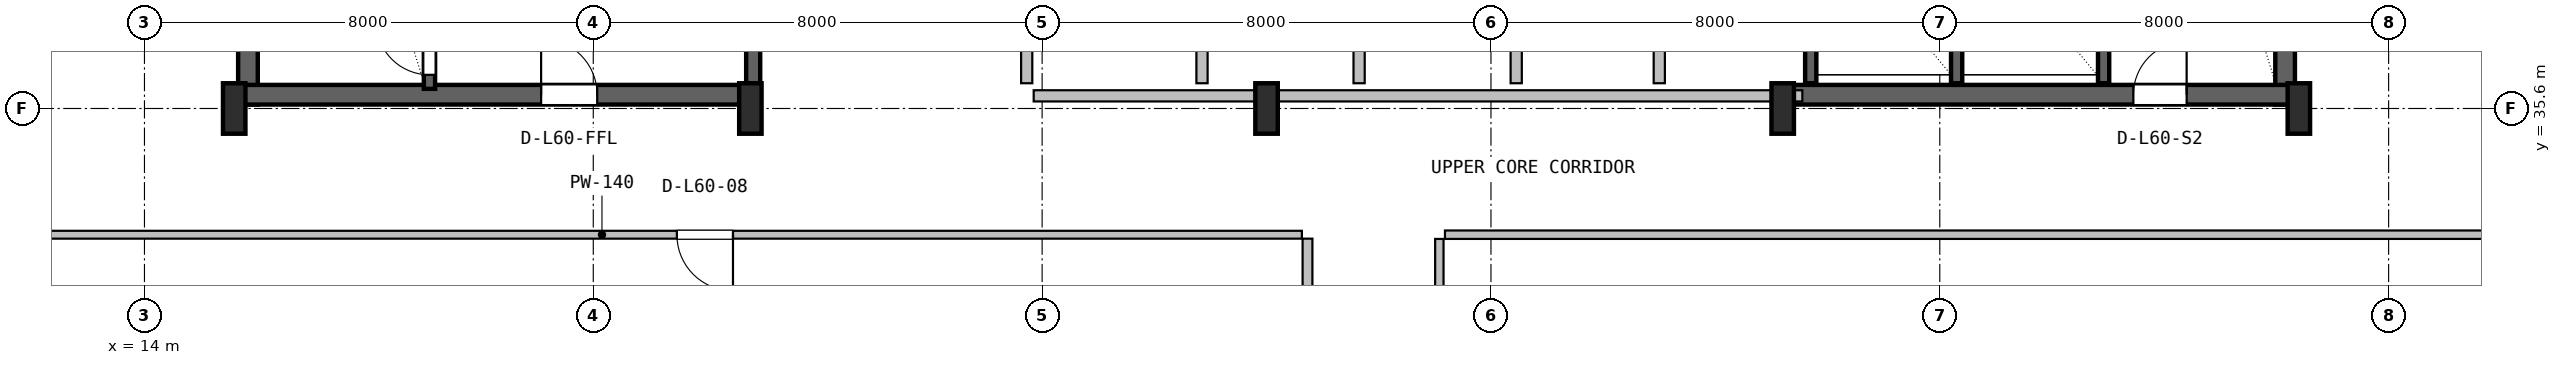
"""IFC4 building model, lengths in metres.
Left out: names, types, materials, properties, quantities, classifications, styles, units other than length and angle.
Written with IfcOpenShell. Run it as: python <this file> out.ifc"""

import sys

from ifc_helpers import new_model, si_unit, direction, frame, frame_2d, origin, origin_2d, place, context, subcontext, project, spatial, rectangle, i_section, extrude, source, transform, mapped, element, fill, save


model = new_model("IFC4")
c1 = context("Model", 3, precision=1e-05, world=origin(), true_north=direction((0.0, 1.0)))
c2 = subcontext(c1, "Body", "Model", "MODEL_VIEW")
j1 = project(units=[si_unit("LENGTHUNIT", "METRE"), si_unit("PLANEANGLEUNIT", "RADIAN")], contexts=[c1])
p1 = place(None, origin())
s1 = spatial("IfcSite", under=j1, at=p1, CompositionType="ELEMENT")
p2 = place(p1, origin())
s2 = spatial("IfcBuilding", under=s1, at=p2, CompositionType="ELEMENT")
p3 = place(p2, frame((0.0, 0.0, 243.2)))
s3 = spatial("IfcBuildingStorey", under=s2, at=p3, CompositionType="ELEMENT", Elevation=243.2)
for number, where, z_axis, x_axis in (
    (1, (15.845, 35.67, 0.0), (0.0, 0.0, 1.0), (0.0, 1.0, 0.0)),
    (2, (52.155, 35.67, 0.0), (0.0, 0.0, 1.0), (0.0, 1.0, 0.0)),
):
    element("IfcWall", number, at=place(p3, frame(where, z_axis=z_axis, x_axis=x_axis)), inside=s3, PredefinedType="SHEAR", context=c2, shape_type="SweptSolid", body=[
        extrude(rectangle(XDim=11.13, YDim=0.35, at=frame_2d((5.565, 0.0))), origin(), (0.0, 0.0, 1.0), 3.55),
    ])
p4 = place(p3, frame((15.67, 35.845, 0.0), z_axis=(0.0, 0.0, 1.0), x_axis=(1.0, 0.0, 0.0)))
e3 = element("IfcWall", 3, at=p4, inside=s3, PredefinedType="SHEAR", context=c2, shape_type="SweptSolid", body=[
    extrude(rectangle(XDim=9.13, YDim=0.35, at=frame_2d((4.565, 0.0))), origin(), (0.0, 0.0, 1.0), 3.55),
])
p5 = place(p4, frame((5.4, 0.0, 0.0)))
e4 = element("IfcOpeningElement", 4, at=p5, cuts=e3, PredefinedType="OPENING", context=c2, shape_type="SweptSolid", body=[
    extrude(rectangle(XDim=1.0, YDim=2.1, at=frame_2d((0.5, 1.05))), frame((0.0, 0.185, 0.0), z_axis=(0.0, -1.0, 0.0), x_axis=(1.0, 0.0, 0.0)), (0.0, 0.0, 1.0), 0.37),
])
p6 = place(p3, frame((43.2, 35.845, 0.0), z_axis=(0.0, 0.0, 1.0), x_axis=(1.0, 0.0, 0.0)))
e5 = element("IfcWall", 5, at=p6, inside=s3, PredefinedType="SHEAR", context=c2, shape_type="SweptSolid", body=[
    extrude(rectangle(XDim=9.13, YDim=0.35, at=frame_2d((4.565, 0.0))), origin(), (0.0, 0.0, 1.0), 3.55),
])
p7 = place(p6, frame((6.25, 0.0, 0.0)))
e6 = element("IfcOpeningElement", 6, at=p7, cuts=e5, PredefinedType="OPENING", context=c2, shape_type="SweptSolid", body=[
    extrude(rectangle(XDim=0.95, YDim=2.1, at=frame_2d((0.475, 1.05))), frame((0.0, 0.185, 0.0), z_axis=(0.0, -1.0, 0.0), x_axis=(1.0, 0.0, 0.0)), (0.0, 0.0, 1.0), 0.37),
])
m1 = source(origin(), c2, "Body", "SweptSolid", [
    extrude(i_section(OverallWidth=0.4, OverallDepth=0.9, WebThickness=0.016, FlangeThickness=0.028, FilletRadius=0.016, at=origin_2d()), origin(), (0.0, 0.0, 1.0), 3.8),
])
for number, where, z_axis, x_axis in (
    (7, (15.6, 35.6, 0.0), (0.0, 0.0, 1.0), (1.0, 0.0, 0.0)),
    (8, (24.8, 35.6, 0.0), (0.0, 0.0, 1.0), (1.0, 0.0, 0.0)),
    (9, (34.0, 35.6, 0.0), (0.0, 0.0, 1.0), (1.0, 0.0, 0.0)),
    (10, (43.2, 35.6, 0.0), (0.0, 0.0, 1.0), (1.0, 0.0, 0.0)),
    (11, (52.4, 35.6, 0.0), (0.0, 0.0, 1.0), (1.0, 0.0, 0.0)),
):
    element("IfcColumn", number, at=place(p3, frame(where, z_axis=z_axis, x_axis=x_axis)), inside=s3, PredefinedType="COLUMN", context=c2, shape_type="MappedRepresentation", body=[
        mapped(m1, transform((0.0, 0.0, 0.0), x_axis=(1.0, 0.0, 0.0), y_axis=(0.0, 1.0, 0.0), z_axis=(0.0, 0.0, 1.0), scale=1.0)),
    ])
p8 = place(p3, frame((19.08, 35.95, 0.0), z_axis=(0.0, 0.0, 1.0), x_axis=(0.0, 1.0, 0.0)))
e12 = element("IfcWall", 12, at=p8, inside=s3, PredefinedType="SHEAR", context=c2, shape_type="SweptSolid", body=[
    extrude(rectangle(XDim=9.65, YDim=0.2, at=frame_2d((4.825, 0.0))), origin(), (0.0, 0.0, 1.0), 3.55),
])
p9 = place(p8, frame((0.25, 0.0, 0.0)))
e13 = element("IfcOpeningElement", 13, at=p9, cuts=e12, PredefinedType="OPENING", context=c2, shape_type="SweptSolid", body=[
    extrude(rectangle(XDim=0.95, YDim=2.1, at=frame_2d((0.475, 1.05))), frame((0.0, 0.11, 0.0), z_axis=(0.0, -1.0, 0.0), x_axis=(1.0, 0.0, 0.0)), (0.0, 0.0, 1.0), 0.22),
])
p10 = place(p3, frame((24.85, 36.05, 0.0), z_axis=(0.0, 0.0, 1.0), x_axis=(0.0, 1.0, 0.0)))
e14 = element("IfcWall", 14, at=p10, inside=s3, PredefinedType="SHEAR", context=c2, shape_type="SweptSolid", body=[
    extrude(rectangle(XDim=10.45, YDim=0.25, at=frame_2d((5.225, 0.0))), origin(), (0.0, 0.0, 1.0), 3.55),
])
p11 = place(p3, frame((48.92, 36.05, 0.0), z_axis=(0.0, 0.0, 1.0), x_axis=(0.0, 1.0, 0.0)))
e15 = element("IfcWall", 15, at=p11, inside=s3, PredefinedType="SHEAR", context=c2, shape_type="SweptSolid", body=[
    extrude(rectangle(XDim=10.5, YDim=0.2, at=frame_2d((5.25, 0.0))), origin(), (0.0, 0.0, 1.0), 3.55),
])
for number, where, z_axis, x_axis in (
    (16, (43.7, 36.05, 0.0), (0.0, 0.0, 1.0), (0.0, 1.0, 0.0)),
    (17, (46.3, 36.05, 0.0), (0.0, 0.0, 1.0), (0.0, 1.0, 0.0)),
):
    element("IfcWall", number, at=place(p3, frame(where, z_axis=z_axis, x_axis=x_axis)), inside=s3, PredefinedType="SHEAR", context=c2, shape_type="SweptSolid", body=[
        extrude(rectangle(XDim=3.05, YDim=0.2, at=frame_2d((1.525, 0.0))), origin(), (0.0, 0.0, 1.0), 3.55),
    ])
p12 = place(p3, frame((29.85, 35.825, 0.0), z_axis=(0.0, 0.0, 1.0), x_axis=(1.0, 0.0, 0.0)))
e18 = element("IfcWall", 18, at=p12, inside=s3, PredefinedType="SOLIDWALL", context=c2, shape_type="SweptSolid", body=[
    extrude(rectangle(XDim=13.7, YDim=0.2, at=frame_2d((6.85, 0.0))), origin(), (0.0, 0.0, 1.0), 2.575),
])
for number, where, z_axis, x_axis in (
    (19, (32.85, 36.05, 0.0), (0.0, 0.0, 1.0), (0.0, 1.0, 0.0)),
    (20, (29.725, 36.05, 0.0), (0.0, 0.0, 1.0), (0.0, 1.0, 0.0)),
    (21, (35.65, 36.05, 0.0), (0.0, 0.0, 1.0), (0.0, 1.0, 0.0)),
    (22, (38.45, 36.05, 0.0), (0.0, 0.0, 1.0), (0.0, 1.0, 0.0)),
):
    element("IfcWall", number, at=place(p3, frame(where, z_axis=z_axis, x_axis=x_axis)), inside=s3, PredefinedType="PLUMBINGWALL", context=c2, shape_type="SweptSolid", body=[
        extrude(rectangle(XDim=3.1, YDim=0.2, at=frame_2d((1.55, 0.0))), origin(), (0.0, 0.0, 1.0), 3.53),
    ])
p13 = place(p3, frame((41.0, 36.05, 0.0), z_axis=(0.0, 0.0, 1.0), x_axis=(0.0, 1.0, 0.0)))
e23 = element("IfcWall", 23, at=p13, inside=s3, PredefinedType="SOLIDWALL", context=c2, shape_type="SweptSolid", body=[
    extrude(rectangle(XDim=3.1, YDim=0.2, at=frame_2d((1.55, 0.0))), origin(), (0.0, 0.0, 1.0), 3.53),
])
p14 = place(p3, frame((34.73, 17.837, 0.0), z_axis=(0.0, 0.0, 1.0), x_axis=(0.0, 1.0, 0.0)))
e24 = element("IfcWall", 24, at=p14, inside=s3, PredefinedType="PARTITIONING", context=c2, shape_type="SweptSolid", body=[
    extrude(rectangle(XDim=15.443, YDim=0.175, at=frame_2d((7.722, 0.0))), origin(), (0.0, 0.0, 1.0), 2.908),
])
p15 = place(p3, frame((9.68, 33.35, 0.0), z_axis=(0.0, 0.0, 1.0), x_axis=(1.0, 0.0, 0.0)))
e25 = element("IfcWall", 25, at=p15, inside=s3, PredefinedType="PARTITIONING", context=c2, shape_type="SweptSolid", body=[
    extrude(rectangle(XDim=24.95, YDim=0.14, at=frame_2d((12.475, 0.0))), origin(), (0.0, 0.0, 1.0), 2.908),
])
p16 = place(p15, frame((13.81, 0.0, 0.0)))
e26 = element("IfcOpeningElement", 26, at=p16, cuts=e25, PredefinedType="OPENING", context=c2, shape_type="SweptSolid", body=[
    extrude(rectangle(XDim=1.0, YDim=2.1, at=frame_2d((0.5, 1.05))), frame((0.0, 0.08, 0.0), z_axis=(0.0, -1.0, 0.0), x_axis=(1.0, 0.0, 0.0)), (0.0, 0.0, 1.0), 0.16),
])
p17 = place(p3, frame((37.18, 33.35, 0.0), z_axis=(0.0, 0.0, 1.0), x_axis=(1.0, 0.0, 0.0)))
e27 = element("IfcWall", 27, at=p17, inside=s3, PredefinedType="PARTITIONING", context=c2, shape_type="SweptSolid", body=[
    extrude(rectangle(XDim=21.14, YDim=0.15, at=frame_2d((10.57, 0.0))), origin(), (0.0, 0.0, 1.0), 2.908),
])
p18 = place(p3, frame((37.08, 10.38, 0.0), z_axis=(0.0, 0.0, 1.0), x_axis=(0.0, 1.0, 0.0)))
e28 = element("IfcWall", 28, at=p18, inside=s3, PredefinedType="PARTITIONING", context=c2, shape_type="SweptSolid", body=[
    extrude(rectangle(XDim=22.895, YDim=0.15, at=frame_2d((11.448, 0.0))), origin(), (0.0, 0.0, 1.0), 2.908),
])
p19 = place(p18, frame((11.45, 0.0, 0.0)))
e29 = element("IfcOpeningElement", 29, at=p19, cuts=e28, PredefinedType="OPENING", context=c2, shape_type="SweptSolid", body=[
    extrude(rectangle(XDim=0.88, YDim=2.06, at=frame_2d((0.44, 1.03))), frame((0.0, 0.085, 0.0), z_axis=(0.0, -1.0, 0.0), x_axis=(1.0, 0.0, 0.0)), (0.0, 0.0, 1.0), 0.17),
])
m2 = source(origin(), c2, "Body", "SweptSolid", [
    extrude(rectangle(XDim=0.95, YDim=2.1, at=frame_2d((0.475, 1.05))), frame((0.0, 0.025, 0.0), z_axis=(0.0, -1.0, 0.0), x_axis=(1.0, 0.0, 0.0)), (0.0, 0.0, 1.0), 0.05),
])
p20 = place(p9, origin())
e30 = element("IfcDoor", 30, at=p20, inside=s3, OperationType="SINGLE_SWING_RIGHT", PredefinedType="DOOR", context=c2, shape_type="MappedRepresentation", body=[
    mapped(m2, transform((0.0, 0.0, 0.0), x_axis=(1.0, 0.0, 0.0), y_axis=(0.0, 1.0, 0.0), z_axis=(0.0, 0.0, 1.0), scale=1.0)),
])
fill(e13, e30)
m3 = source(origin(), c2, "Body", "SweptSolid", [
    extrude(rectangle(XDim=1.0, YDim=2.1, at=frame_2d((0.5, 1.05))), frame((0.0, 0.025, 0.0), z_axis=(0.0, -1.0, 0.0), x_axis=(1.0, 0.0, 0.0)), (0.0, 0.0, 1.0), 0.05),
])
p21 = place(p5, origin())
e31 = element("IfcDoor", 31, at=p21, inside=s3, OperationType="SINGLE_SWING_LEFT", PredefinedType="DOOR", context=c2, shape_type="MappedRepresentation", body=[
    mapped(m3, transform((0.0, 0.0, 0.0), x_axis=(1.0, 0.0, 0.0), y_axis=(0.0, 1.0, 0.0), z_axis=(0.0, 0.0, 1.0), scale=1.0)),
])
fill(e4, e31)
p22 = place(p7, origin())
e32 = element("IfcDoor", 32, at=p22, inside=s3, OperationType="SINGLE_SWING_RIGHT", PredefinedType="DOOR", context=c2, shape_type="MappedRepresentation", body=[
    mapped(m2, transform((0.0, 0.0, 0.0), x_axis=(1.0, 0.0, 0.0), y_axis=(0.0, 1.0, 0.0), z_axis=(0.0, 0.0, 1.0), scale=1.0)),
])
fill(e6, e32)
m4 = source(origin(), c2, "Body", "SweptSolid", [
    extrude(rectangle(XDim=1.0, YDim=2.1, at=frame_2d((0.5, 1.05))), frame((0.0, 0.025, 0.0), z_axis=(0.0, -1.0, 0.0), x_axis=(1.0, 0.0, 0.0)), (0.0, 0.0, 1.0), 0.05),
])
p23 = place(p16, frame((1.0, 0.0, 0.0), z_axis=(0.0, 0.0, 1.0), x_axis=(-1.0, 0.0, 0.0)))
e33 = element("IfcDoor", 33, at=p23, inside=s3, OperationType="SINGLE_SWING_RIGHT", PredefinedType="DOOR", context=c2, shape_type="MappedRepresentation", body=[
    mapped(m4, transform((0.0, 0.0, 0.0), x_axis=(1.0, 0.0, 0.0), y_axis=(0.0, 1.0, 0.0), z_axis=(0.0, 0.0, 1.0), scale=1.0)),
])
fill(e26, e33)
save(model, sys.argv[1])
